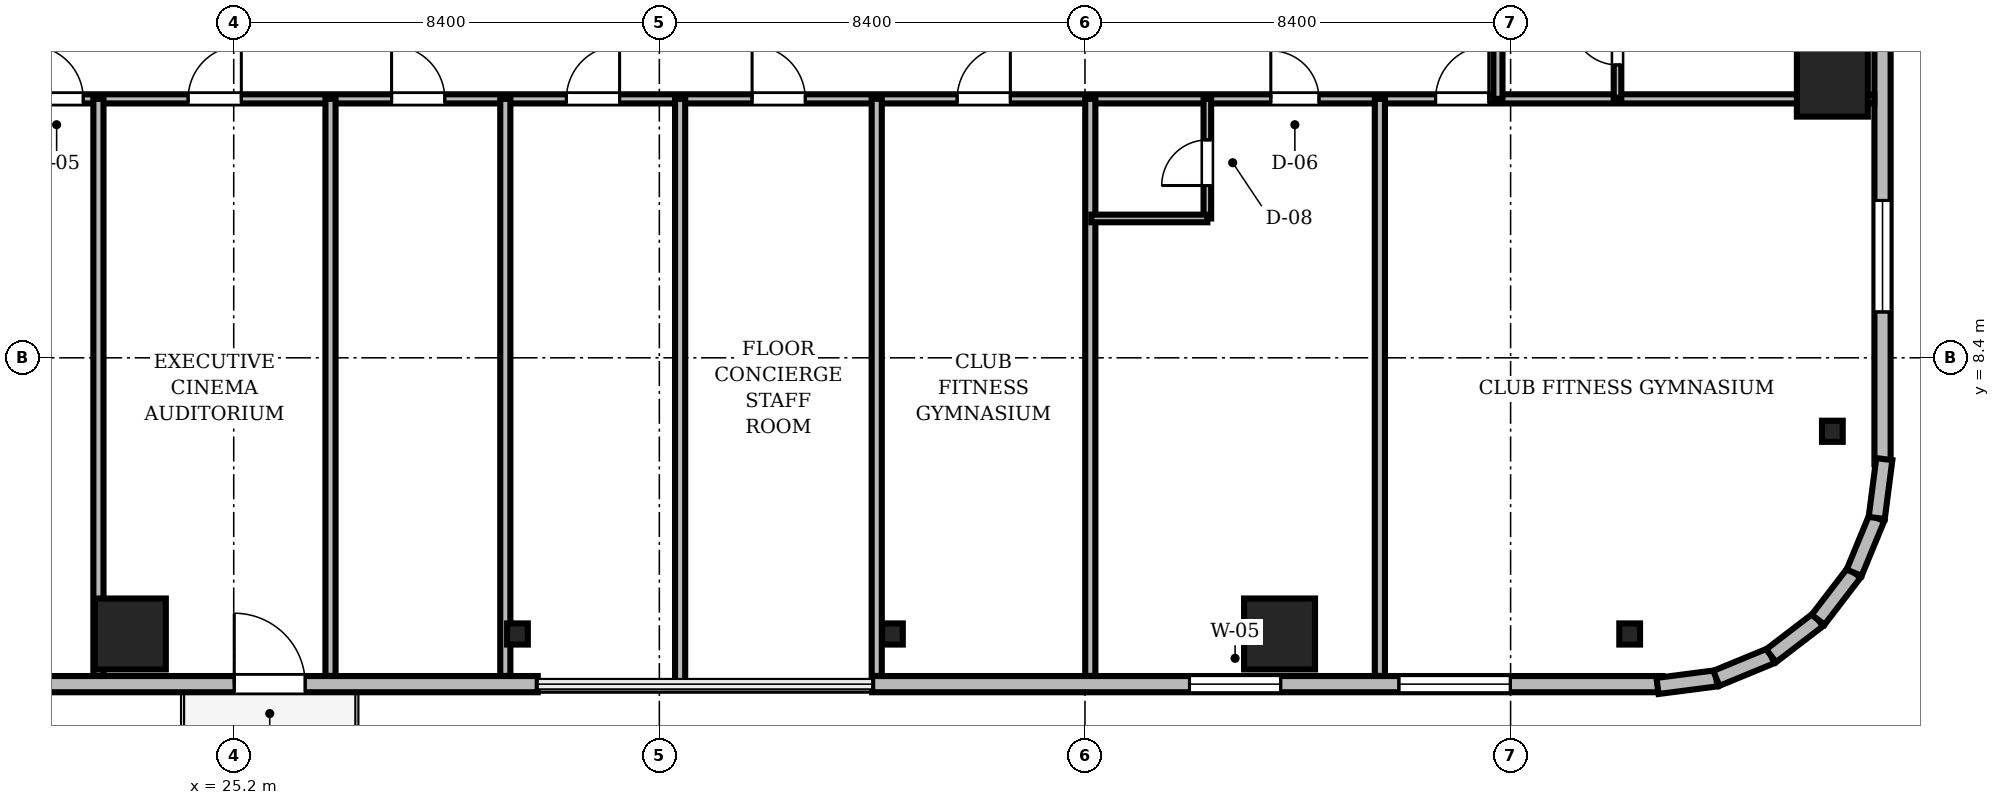
"""IFC4 building model, lengths in metres.
Left out: names, types, materials, properties, quantities, classifications, styles, units other than length and angle.
Written with IfcOpenShell. Run it as: python <this file> out.ifc"""

import sys

from ifc_helpers import new_model, si_unit, direction, frame, frame_2d, origin, origin_2d, place, context, subcontext, project, spatial, rectangle, i_section, extrude, source, transform, mapped, element, fill, save


model = new_model("IFC4")
c1 = context("Model", 3, precision=1e-05, world=origin(), true_north=direction((0.0, 1.0)))
c2 = subcontext(c1, "Body", "Model", "MODEL_VIEW")
j1 = project(units=[si_unit("LENGTHUNIT", "METRE"), si_unit("PLANEANGLEUNIT", "RADIAN")], contexts=[c1])
p1 = place(None, origin())
s1 = spatial("IfcSite", under=j1, at=p1, CompositionType="ELEMENT")
p2 = place(p1, origin())
s2 = spatial("IfcBuilding", under=s1, at=p2, CompositionType="ELEMENT")
p3 = place(p2, frame((0.0, 0.0, 177.2)))
s3 = spatial("IfcBuildingStorey", under=s2, at=p3, CompositionType="ELEMENT", Elevation=177.2)
m1 = source(origin(), c2, "Body", "SweptSolid", [
    extrude(rectangle(XDim=1.4, YDim=1.4, at=origin_2d()), origin(), (0.0, 0.0, 1.0), 3.58),
])
for number, where, z_axis, x_axis in (
    (1, (23.16, 2.95, 0.0), (0.0, 0.0, 1.0), (1.0, 0.0, 0.0)),
    (2, (45.84, 2.95, 0.0), (0.0, 0.0, 1.0), (1.0, 0.0, 0.0)),
    (3, (56.75, 13.86, 0.0), (0.0, 0.0, 1.0), (1.0, 0.0, 0.0)),
):
    element("IfcColumn", number, at=place(p3, frame(where, z_axis=z_axis, x_axis=x_axis)), inside=s3, PredefinedType="COLUMN", context=c2, shape_type="MappedRepresentation", body=[
        mapped(m1, transform((0.0, 0.0, 0.0), scale=1.0)),
    ])
m2 = source(origin(), c2, "Body", "SweptSolid", [
    extrude(i_section(OverallWidth=0.409, OverallDepth=0.417, WebThickness=0.021, FlangeThickness=0.033, FilletRadius=0.015, at=origin_2d()), origin(), (0.0, 0.0, 1.0), 3.58),
])
for number, where, z_axis, x_axis in (
    (4, (30.8, 2.95, 0.0), (0.0, 0.0, 1.0), (1.0, 0.0, 0.0)),
    (5, (38.2, 2.95, 0.0), (0.0, 0.0, 1.0), (1.0, 0.0, 0.0)),
    (6, (52.75, 2.95, 0.0), (0.0, 0.0, 1.0), (1.0, 0.0, 0.0)),
    (7, (56.75, 6.95, 0.0), (0.0, 0.0, 1.0), (1.0, 0.0, 0.0)),
):
    element("IfcColumn", number, at=place(p3, frame(where, z_axis=z_axis, x_axis=x_axis)), inside=s3, PredefinedType="COLUMN", context=c2, shape_type="MappedRepresentation", body=[
        mapped(m2, transform((0.0, 0.0, 0.0), scale=1.0)),
    ])
m3 = source(origin(), c2, "Body", "SweptSolid", [
    extrude(rectangle(XDim=15.6, YDim=0.32, at=frame_2d((7.8, 0.0))), origin(), (0.0, 0.0, 1.0), 3.58),
])
p4 = place(p3, frame((15.6, 1.96, 0.0), z_axis=(0.0, 0.0, 1.0), x_axis=(1.0, 0.0, 0.0)))
e8 = element("IfcWall", 8, at=p4, inside=s3, PredefinedType="SOLIDWALL", context=c2, shape_type="MappedRepresentation", body=[
    mapped(m3, transform((0.0, 0.0, 0.0), scale=1.0)),
])
m4 = source(origin(), c2, "Body", "SweptSolid", [
    extrude(rectangle(XDim=1.4, YDim=2.3, at=frame_2d((0.7, 1.15))), frame((0.0, 0.17, 0.0), z_axis=(0.0, -1.0, 0.0), x_axis=(1.0, 0.0, 0.0)), (0.0, 0.0, 1.0), 0.34),
])
p5 = place(p4, frame((9.61, 0.0, 0.0)))
e9 = element("IfcOpeningElement", 9, at=p5, cuts=e8, PredefinedType="OPENING", context=c2, shape_type="MappedRepresentation", body=[
    mapped(m4, transform((0.0, 0.0, 0.0), scale=1.0)),
])
m5 = source(origin(), c2, "Body", "SweptSolid", [
    extrude(rectangle(XDim=2.2, YDim=2.4, at=frame_2d((1.1, 1.2))), frame((0.0, 0.17, 0.0), z_axis=(0.0, -1.0, 0.0), x_axis=(1.0, 0.0, 0.0)), (0.0, 0.0, 1.0), 0.34),
])
p6 = place(p4, frame((3.005, 0.0, 0.72)))
e10 = element("IfcOpeningElement", 10, at=p6, cuts=e8, PredefinedType="OPENING", context=c2, shape_type="MappedRepresentation", body=[
    mapped(m5, transform((0.0, 0.0, 0.0), scale=1.0)),
])
p7 = place(p3, frame((37.8, 1.96, 0.0), z_axis=(0.0, 0.0, 1.0), x_axis=(1.0, 0.0, 0.0)))
e11 = element("IfcWall", 11, at=p7, inside=s3, PredefinedType="SOLIDWALL", context=c2, shape_type="MappedRepresentation", body=[
    mapped(m3, transform((0.0, 0.0, 0.0), scale=1.0)),
])
p8 = place(p7, frame((10.395, 0.0, 0.72)))
e12 = element("IfcOpeningElement", 12, at=p8, cuts=e11, PredefinedType="OPENING", context=c2, shape_type="MappedRepresentation", body=[
    mapped(m5, transform((0.0, 0.0, 0.0), scale=1.0)),
])
m6 = source(origin(), c2, "Body", "SweptSolid", [
    extrude(rectangle(XDim=1.8, YDim=2.4, at=frame_2d((0.9, 1.2))), frame((0.0, 0.17, 0.0), z_axis=(0.0, -1.0, 0.0), x_axis=(1.0, 0.0, 0.0)), (0.0, 0.0, 1.0), 0.34),
])
p9 = place(p7, frame((6.262, 0.0, 0.72)))
e13 = element("IfcOpeningElement", 13, at=p9, cuts=e11, PredefinedType="OPENING", context=c2, shape_type="MappedRepresentation", body=[
    mapped(m6, transform((0.0, 0.0, 0.0), scale=1.0)),
])
p10 = place(p3, frame((57.74, 6.3, 0.0), z_axis=(0.0, 0.0, 1.0), x_axis=(0.0, 1.0, 0.0)))
e14 = element("IfcWall", 14, at=p10, inside=s3, PredefinedType="SOLIDWALL", context=c2, shape_type="MappedRepresentation", body=[
    mapped(m3, transform((0.0, 0.0, 0.0), scale=1.0)),
])
p11 = place(p10, frame((9.61, 0.0, 0.0)))
e15 = element("IfcOpeningElement", 15, at=p11, cuts=e14, PredefinedType="OPENING", context=c2, shape_type="MappedRepresentation", body=[
    mapped(m4, transform((0.0, 0.0, 0.0), scale=1.0)),
])
p12 = place(p10, frame((3.005, 0.0, 0.72)))
e16 = element("IfcOpeningElement", 16, at=p12, cuts=e14, PredefinedType="OPENING", context=c2, shape_type="MappedRepresentation", body=[
    mapped(m5, transform((0.0, 0.0, 0.0), scale=1.0)),
])
m7 = source(origin(), c2, "Body", "SweptSolid", [
    extrude(rectangle(XDim=1.17, YDim=0.32, at=frame_2d((0.585, 0.0))), origin(), (0.0, 0.0, 1.0), 3.58),
])
p13 = place(p3, frame((53.3, 1.925, 0.0), z_axis=(0.0, 0.0, 1.0), x_axis=(0.991762485493, 0.128090485085, 0.0)))
e17 = element("IfcWall", 17, at=p13, inside=s3, PredefinedType="SOLIDWALL", context=c2, shape_type="MappedRepresentation", body=[
    mapped(m7, transform((0.0, 0.0, 0.0), scale=1.0)),
])
m8 = source(origin(), c2, "Body", "SweptSolid", [
    extrude(rectangle(XDim=1.169, YDim=0.32, at=frame_2d((0.585, 0.0))), origin(), (0.0, 0.0, 1.0), 3.58),
])
p14 = place(p3, frame((54.46, 2.074, 0.0), z_axis=(0.0, 0.0, 1.0), x_axis=(0.924479075121, 0.381232789334, 0.0)))
e18 = element("IfcWall", 18, at=p14, inside=s3, PredefinedType="SOLIDWALL", context=c2, shape_type="MappedRepresentation", body=[
    mapped(m8, transform((0.0, 0.0, 0.0), scale=1.0)),
])
m9 = source(origin(), c2, "Body", "SweptSolid", [
    extrude(rectangle(XDim=1.169, YDim=0.32, at=frame_2d((0.584, 0.0))), origin(), (0.0, 0.0, 1.0), 3.58),
])
p15 = place(p3, frame((55.541, 2.52, 0.0), z_axis=(0.0, 0.0, 1.0), x_axis=(0.793663520347, 0.608356981114, 0.0)))
e19 = element("IfcWall", 19, at=p15, inside=s3, PredefinedType="SOLIDWALL", context=c2, shape_type="MappedRepresentation", body=[
    mapped(m9, transform((0.0, 0.0, 0.0), scale=1.0)),
])
m10 = source(origin(), c2, "Body", "SweptSolid", [
    extrude(rectangle(XDim=1.169, YDim=0.32, at=frame_2d((0.584, 0.0))), origin(), (0.0, 0.0, 1.0), 3.58),
])
for number, where, z_axis, x_axis in (
    (20, (56.469, 3.231, 0.0), (0.0, 0.0, 1.0), (0.608, 0.794, 0.0)),
    (21, (57.18, 4.159, 0.0), (0.0, 0.0, 1.0), (0.381, 0.925, 0.0)),
):
    element("IfcWall", number, at=place(p3, frame(where, z_axis=z_axis, x_axis=x_axis)), inside=s3, PredefinedType="SOLIDWALL", context=c2, shape_type="MappedRepresentation", body=[
        mapped(m10, transform((0.0, 0.0, 0.0), scale=1.0)),
    ])
m11 = source(origin(), c2, "Body", "SweptSolid", [
    extrude(rectangle(XDim=1.171, YDim=0.32, at=frame_2d((0.585, 0.0))), origin(), (0.0, 0.0, 1.0), 3.58),
])
p16 = place(p3, frame((57.625, 5.24, 0.0), z_axis=(0.0, 0.0, 1.0), x_axis=(0.128269133229, 0.991739395941, 0.0)))
e22 = element("IfcWall", 22, at=p16, inside=s3, PredefinedType="SOLIDWALL", context=c2, shape_type="MappedRepresentation", body=[
    mapped(m11, transform((0.0, 0.0, 0.0), scale=1.0)),
])
m12 = source(origin(), c2, "Body", "SweptSolid", [
    extrude(rectangle(XDim=46.156, YDim=0.18, at=frame_2d((23.078, 0.0))), origin(), (0.0, 0.0, 1.0), 2.822),
])
p17 = place(p3, frame((11.422, 13.51, 0.0), z_axis=(0.0, 0.0, 1.0), x_axis=(1.0, 0.0, 0.0)))
e23 = element("IfcWall", 23, at=p17, inside=s3, PredefinedType="PARTITIONING", context=c2, shape_type="MappedRepresentation", body=[
    mapped(m12, transform((0.0, 0.0, 0.0), scale=1.0)),
])
m13 = source(origin(), c2, "Body", "SweptSolid", [
    extrude(rectangle(XDim=1.05, YDim=2.2, at=frame_2d((0.525, 1.1))), frame((0.0, 0.1, 0.0), z_axis=(0.0, -1.0, 0.0), x_axis=(1.0, 0.0, 0.0)), (0.0, 0.0, 1.0), 0.2),
])
p18 = place(p17, frame((9.758, 0.0, 0.0)))
e24 = element("IfcOpeningElement", 24, at=p18, cuts=e23, PredefinedType="OPENING", context=c2, shape_type="MappedRepresentation", body=[
    mapped(m13, transform((0.0, 0.0, 0.0), scale=1.0)),
])
p19 = place(p17, frame((12.878, 0.0, 0.0)))
e25 = element("IfcOpeningElement", 25, at=p19, cuts=e23, PredefinedType="OPENING", context=c2, shape_type="MappedRepresentation", body=[
    mapped(m13, transform((0.0, 0.0, 0.0), scale=1.0)),
])
p20 = place(p17, frame((16.893, 0.0, 0.0)))
e26 = element("IfcOpeningElement", 26, at=p20, cuts=e23, PredefinedType="OPENING", context=c2, shape_type="MappedRepresentation", body=[
    mapped(m13, transform((0.0, 0.0, 0.0), scale=1.0)),
])
p21 = place(p17, frame((20.344, 0.0, 0.0)))
e27 = element("IfcOpeningElement", 27, at=p21, cuts=e23, PredefinedType="OPENING", context=c2, shape_type="MappedRepresentation", body=[
    mapped(m13, transform((0.0, 0.0, 0.0), scale=1.0)),
])
p22 = place(p17, frame((24.008, 0.0, 0.0)))
e28 = element("IfcOpeningElement", 28, at=p22, cuts=e23, PredefinedType="OPENING", context=c2, shape_type="MappedRepresentation", body=[
    mapped(m13, transform((0.0, 0.0, 0.0), scale=1.0)),
])
p23 = place(p17, frame((28.055, 0.0, 0.0)))
e29 = element("IfcOpeningElement", 29, at=p23, cuts=e23, PredefinedType="OPENING", context=c2, shape_type="MappedRepresentation", body=[
    mapped(m13, transform((0.0, 0.0, 0.0), scale=1.0)),
])
m14 = source(origin(), c2, "Body", "SweptSolid", [
    extrude(rectangle(XDim=0.95, YDim=2.15, at=frame_2d((0.475, 1.075))), frame((0.0, 0.1, 0.0), z_axis=(0.0, -1.0, 0.0), x_axis=(1.0, 0.0, 0.0)), (0.0, 0.0, 1.0), 0.2),
])
p24 = place(p17, frame((34.246, 0.0, 0.0)))
e30 = element("IfcOpeningElement", 30, at=p24, cuts=e23, PredefinedType="OPENING", context=c2, shape_type="MappedRepresentation", body=[
    mapped(m14, transform((0.0, 0.0, 0.0), scale=1.0)),
])
p25 = place(p17, frame((37.498, 0.0, 0.0)))
e31 = element("IfcOpeningElement", 31, at=p25, cuts=e23, PredefinedType="OPENING", context=c2, shape_type="MappedRepresentation", body=[
    mapped(m13, transform((0.0, 0.0, 0.0), scale=1.0)),
])
m15 = source(origin(), c2, "Body", "SweptSolid", [
    extrude(rectangle(XDim=27.59, YDim=0.18, at=frame_2d((13.795, 0.0))), origin(), (0.0, 0.0, 1.0), 3.022),
])
p26 = place(p3, frame((50.15, 13.51, 0.0), z_axis=(0.0, 0.0, 1.0), x_axis=(0.0, 1.0, 0.0)))
e32 = element("IfcWall", 32, at=p26, inside=s3, PredefinedType="PARTITIONING", context=c2, shape_type="MappedRepresentation", body=[
    mapped(m15, transform((0.0, 0.0, 0.0), scale=1.0)),
])
p27 = place(p26, frame((4.086, 0.0, 0.0)))
e33 = element("IfcOpeningElement", 33, at=p27, cuts=e32, PredefinedType="OPENING", context=c2, shape_type="MappedRepresentation", body=[
    mapped(m13, transform((0.0, 0.0, 0.0), scale=1.0)),
])
p28 = place(p26, frame((9.744, 0.0, 0.0)))
e34 = element("IfcOpeningElement", 34, at=p28, cuts=e32, PredefinedType="OPENING", context=c2, shape_type="MappedRepresentation", body=[
    mapped(m13, transform((0.0, 0.0, 0.0), scale=1.0)),
])
p29 = place(p26, frame((17.771, 0.0, 0.0)))
e35 = element("IfcOpeningElement", 35, at=p29, cuts=e32, PredefinedType="OPENING", context=c2, shape_type="MappedRepresentation", body=[
    mapped(m13, transform((0.0, 0.0, 0.0), scale=1.0)),
])
p30 = place(p26, frame((24.614, 0.0, 0.0)))
e36 = element("IfcOpeningElement", 36, at=p30, cuts=e32, PredefinedType="OPENING", context=c2, shape_type="MappedRepresentation", body=[
    mapped(m13, transform((0.0, 0.0, 0.0), scale=1.0)),
])
m16 = source(origin(), c2, "Body", "SweptSolid", [
    extrude(rectangle(XDim=2.36, YDim=0.15, at=frame_2d((1.18, 0.0))), origin(), (0.0, 0.0, 1.0), 3.242),
])
p31 = place(p3, frame((44.415, 11.15, 0.0), z_axis=(0.0, 0.0, 1.0), x_axis=(0.0, 1.0, 0.0)))
e37 = element("IfcWall", 37, at=p31, inside=s3, PredefinedType="PARTITIONING", context=c2, shape_type="MappedRepresentation", body=[
    mapped(m16, transform((0.0, 0.0, 0.0), scale=1.0)),
])
m17 = source(origin(), c2, "Body", "SweptSolid", [
    extrude(rectangle(XDim=0.9, YDim=2.1, at=frame_2d((0.45, 1.05))), frame((0.0, 0.085, 0.0), z_axis=(0.0, -1.0, 0.0), x_axis=(1.0, 0.0, 0.0)), (0.0, 0.0, 1.0), 0.17),
])
p32 = place(p31, frame((0.65, 0.0, 0.0)))
e38 = element("IfcOpeningElement", 38, at=p32, cuts=e37, PredefinedType="OPENING", context=c2, shape_type="MappedRepresentation", body=[
    mapped(m17, transform((0.0, 0.0, 0.0), scale=1.0)),
])
m18 = source(origin(), c2, "Body", "SweptSolid", [
    extrude(rectangle(XDim=2.29, YDim=0.15, at=frame_2d((1.145, 0.0))), origin(), (0.0, 0.0, 1.0), 3.022),
])
p33 = place(p3, frame((52.51, 13.53, 0.0), z_axis=(0.0, 0.0, 1.0), x_axis=(0.0, 1.0, 0.0)))
e39 = element("IfcWall", 39, at=p33, inside=s3, PredefinedType="PARTITIONING", context=c2, shape_type="MappedRepresentation", body=[
    mapped(m18, transform((0.0, 0.0, 0.0), scale=1.0)),
])
p34 = place(p33, frame((0.65, 0.0, 0.0)))
e40 = element("IfcOpeningElement", 40, at=p34, cuts=e39, PredefinedType="OPENING", context=c2, shape_type="MappedRepresentation", body=[
    mapped(m17, transform((0.0, 0.0, 0.0), scale=1.0)),
])
m19 = source(origin(), c2, "Body", "SweptSolid", [
    extrude(rectangle(XDim=11.388, YDim=0.2, at=frame_2d((5.694, 0.0))), origin(), (0.0, 0.0, 1.0), 2.822),
])
for number, where, z_axis, x_axis in (
    (41, (22.53, 2.122, 0.0), (0.0, 0.0, 1.0), (0.0, 1.0, 0.0)),
    (42, (27.11, 2.122, 0.0), (0.0, 0.0, 1.0), (0.0, 1.0, 0.0)),
    (43, (30.56, 2.122, 0.0), (0.0, 0.0, 1.0), (0.0, 1.0, 0.0)),
):
    element("IfcWall", number, at=place(p3, frame(where, z_axis=z_axis, x_axis=x_axis)), inside=s3, PredefinedType="PARTITIONING", context=c2, shape_type="MappedRepresentation", body=[
        mapped(m19, transform((0.0, 0.0, 0.0), scale=1.0)),
    ])
m20 = source(origin(), c2, "Body", "SweptSolid", [
    extrude(rectangle(XDim=11.58, YDim=0.2, at=frame_2d((5.79, 0.0))), origin(), (0.0, 0.0, 1.0), 2.822),
])
p35 = place(p3, frame((34.01, 1.93, 0.0), z_axis=(0.0, 0.0, 1.0), x_axis=(0.0, 1.0, 0.0)))
e44 = element("IfcWall", 44, at=p35, inside=s3, PredefinedType="PARTITIONING", context=c2, shape_type="MappedRepresentation", body=[
    mapped(m20, transform((0.0, 0.0, 0.0), scale=1.0)),
])
for number, where, z_axis, x_axis in (
    (45, (37.89, 2.122, 0.0), (0.0, 0.0, 1.0), (0.0, 1.0, 0.0)),
    (46, (42.105, 2.122, 0.0), (0.0, 0.0, 1.0), (0.0, 1.0, 0.0)),
    (47, (47.82, 2.122, 0.0), (0.0, 0.0, 1.0), (0.0, 1.0, 0.0)),
):
    element("IfcWall", number, at=place(p3, frame(where, z_axis=z_axis, x_axis=x_axis)), inside=s3, PredefinedType="PARTITIONING", context=c2, shape_type="MappedRepresentation", body=[
        mapped(m19, transform((0.0, 0.0, 0.0), scale=1.0)),
    ])
p36 = place(p3, frame((42.125, 11.15, 0.0), z_axis=(0.0, 0.0, 1.0), x_axis=(1.0, 0.0, 0.0)))
e48 = element("IfcWall", 48, at=p36, inside=s3, PredefinedType="PARTITIONING", context=c2, shape_type="MappedRepresentation", body=[
    mapped(m18, transform((0.0, 0.0, 0.0), scale=1.0)),
])
m21 = source(origin(), c2, "Body", "SweptSolid", [
    extrude(rectangle(XDim=1.4, YDim=2.3, at=frame_2d((0.7, 1.15))), frame((0.0, 0.025, 0.0), z_axis=(0.0, -1.0, 0.0), x_axis=(1.0, 0.0, 0.0)), (0.0, 0.0, 1.0), 0.05),
])
p37 = place(p5, frame((1.4, 0.0, 0.0), z_axis=(0.0, 0.0, 1.0), x_axis=(-1.0, 0.0, 0.0)))
e49 = element("IfcDoor", 49, at=p37, inside=s3, OperationType="DOUBLE_DOOR_SLIDING", PredefinedType="DOOR", context=c2, shape_type="MappedRepresentation", body=[
    mapped(m21, transform((0.0, 0.0, 0.0), scale=1.0)),
])
fill(e9, e49)
m22 = source(origin(), c2, "Body", "SweptSolid", [
    extrude(rectangle(XDim=2.2, YDim=2.4, at=frame_2d((1.1, 1.2))), frame((0.0, 0.03, 0.0), z_axis=(0.0, -1.0, 0.0), x_axis=(1.0, 0.0, 0.0)), (0.0, 0.0, 1.0), 0.06),
])
p38 = place(p8, origin())
e50 = element("IfcWindow", 50, at=p38, inside=s3, PartitioningType="SINGLE_PANEL", PredefinedType="WINDOW", context=c2, shape_type="MappedRepresentation", body=[
    mapped(m22, transform((0.0, 0.0, 0.0), scale=1.0)),
])
fill(e12, e50)
p39 = place(p12, origin())
e51 = element("IfcWindow", 51, at=p39, inside=s3, PartitioningType="SINGLE_PANEL", PredefinedType="WINDOW", context=c2, shape_type="MappedRepresentation", body=[
    mapped(m22, transform((0.0, 0.0, 0.0), scale=1.0)),
])
fill(e16, e51)
m23 = source(origin(), c2, "Body", "SweptSolid", [
    extrude(rectangle(XDim=1.8, YDim=2.4, at=frame_2d((0.9, 1.2))), frame((0.0, 0.03, 0.0), z_axis=(0.0, -1.0, 0.0), x_axis=(1.0, 0.0, 0.0)), (0.0, 0.0, 1.0), 0.06),
])
p40 = place(p9, origin())
e52 = element("IfcWindow", 52, at=p40, inside=s3, PartitioningType="SINGLE_PANEL", PredefinedType="WINDOW", context=c2, shape_type="MappedRepresentation", body=[
    mapped(m23, transform((0.0, 0.0, 0.0), scale=1.0)),
])
fill(e13, e52)
m24 = source(origin(), c2, "Body", "SweptSolid", [
    extrude(rectangle(XDim=1.05, YDim=2.2, at=frame_2d((0.525, 1.1))), frame((0.0, 0.025, 0.0), z_axis=(0.0, -1.0, 0.0), x_axis=(1.0, 0.0, 0.0)), (0.0, 0.0, 1.0), 0.05),
])
p41 = place(p18, origin())
e53 = element("IfcDoor", 53, at=p41, inside=s3, OperationType="SINGLE_SWING_LEFT", PredefinedType="DOOR", context=c2, shape_type="MappedRepresentation", body=[
    mapped(m24, transform((0.0, 0.0, 0.0), scale=1.0)),
])
fill(e24, e53)
p42 = place(p19, origin())
e54 = element("IfcDoor", 54, at=p42, inside=s3, OperationType="SINGLE_SWING_RIGHT", PredefinedType="DOOR", context=c2, shape_type="MappedRepresentation", body=[
    mapped(m24, transform((0.0, 0.0, 0.0), scale=1.0)),
])
fill(e25, e54)
p43 = place(p20, origin())
e55 = element("IfcDoor", 55, at=p43, inside=s3, OperationType="SINGLE_SWING_LEFT", PredefinedType="DOOR", context=c2, shape_type="MappedRepresentation", body=[
    mapped(m24, transform((0.0, 0.0, 0.0), scale=1.0)),
])
fill(e26, e55)
p44 = place(p21, origin())
e56 = element("IfcDoor", 56, at=p44, inside=s3, OperationType="SINGLE_SWING_RIGHT", PredefinedType="DOOR", context=c2, shape_type="MappedRepresentation", body=[
    mapped(m24, transform((0.0, 0.0, 0.0), scale=1.0)),
])
fill(e27, e56)
p45 = place(p22, origin())
e57 = element("IfcDoor", 57, at=p45, inside=s3, OperationType="SINGLE_SWING_LEFT", PredefinedType="DOOR", context=c2, shape_type="MappedRepresentation", body=[
    mapped(m24, transform((0.0, 0.0, 0.0), scale=1.0)),
])
fill(e28, e57)
p46 = place(p23, origin())
e58 = element("IfcDoor", 58, at=p46, inside=s3, OperationType="SINGLE_SWING_RIGHT", PredefinedType="DOOR", context=c2, shape_type="MappedRepresentation", body=[
    mapped(m24, transform((0.0, 0.0, 0.0), scale=1.0)),
])
fill(e29, e58)
m25 = source(origin(), c2, "Body", "SweptSolid", [
    extrude(rectangle(XDim=0.95, YDim=2.15, at=frame_2d((0.475, 1.075))), frame((0.0, 0.025, 0.0), z_axis=(0.0, -1.0, 0.0), x_axis=(1.0, 0.0, 0.0)), (0.0, 0.0, 1.0), 0.05),
])
p47 = place(p24, origin())
e59 = element("IfcDoor", 59, at=p47, inside=s3, OperationType="SINGLE_SWING_LEFT", PredefinedType="DOOR", context=c2, shape_type="MappedRepresentation", body=[
    mapped(m25, transform((0.0, 0.0, 0.0), scale=1.0)),
])
fill(e30, e59)
p48 = place(p25, origin())
e60 = element("IfcDoor", 60, at=p48, inside=s3, OperationType="SINGLE_SWING_RIGHT", PredefinedType="DOOR", context=c2, shape_type="MappedRepresentation", body=[
    mapped(m24, transform((0.0, 0.0, 0.0), scale=1.0)),
])
fill(e31, e60)
m26 = source(origin(), c2, "Body", "SweptSolid", [
    extrude(rectangle(XDim=0.9, YDim=2.1, at=frame_2d((0.45, 1.05))), frame((0.0, 0.025, 0.0), z_axis=(0.0, -1.0, 0.0), x_axis=(1.0, 0.0, 0.0)), (0.0, 0.0, 1.0), 0.05),
])
p49 = place(p32, origin())
e61 = element("IfcDoor", 61, at=p49, inside=s3, OperationType="SINGLE_SWING_LEFT", PredefinedType="DOOR", context=c2, shape_type="MappedRepresentation", body=[
    mapped(m26, transform((0.0, 0.0, 0.0), scale=1.0)),
])
fill(e38, e61)
p50 = place(p34, origin())
e62 = element("IfcDoor", 62, at=p50, inside=s3, OperationType="SINGLE_SWING_RIGHT", PredefinedType="DOOR", context=c2, shape_type="MappedRepresentation", body=[
    mapped(m26, transform((0.0, 0.0, 0.0), scale=1.0)),
])
fill(e40, e62)
save(model, sys.argv[1])
